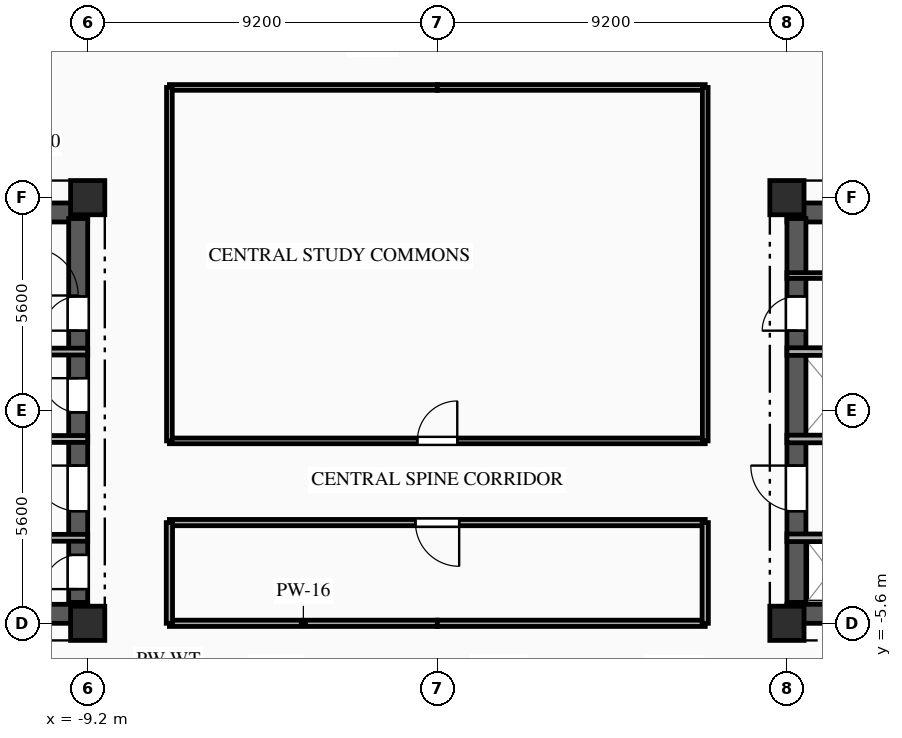
"""IFC4 building model, lengths in metres.
Left out: names, types, materials, properties, quantities, classifications, styles, units other than length and angle.
Written with IfcOpenShell. Run it as: python <this file> out.ifc"""

import sys

from ifc_helpers import new_model, si_unit, direction, frame, frame_2d, origin, origin_2d, place, context, subcontext, project, spatial, rectangle, extrude, element, fill, save


model = new_model("IFC4")
c1 = context("Model", 3, precision=1e-05, world=origin(), true_north=direction((0.0, 1.0)))
c2 = subcontext(c1, "Body", "Model", "MODEL_VIEW")
j1 = project(units=[si_unit("LENGTHUNIT", "METRE"), si_unit("PLANEANGLEUNIT", "RADIAN")], contexts=[c1])
p1 = place(None, origin())
s1 = spatial("IfcSite", under=j1, at=p1, CompositionType="ELEMENT")
p2 = place(p1, origin())
s2 = spatial("IfcBuilding", under=s1, at=p2, CompositionType="ELEMENT")
p3 = place(p2, frame((0.0, 0.0, 151.1)))
s3 = spatial("IfcBuildingStorey", under=s2, at=p3, CompositionType="ELEMENT", Elevation=151.1)
for number, where, z_axis, x_axis in (
    (1, (-9.2, -5.6, 0.0), (0.0, 0.0, 1.0), (1.0, 0.0, 0.0)),
    (2, (-9.2, 5.6, 0.0), (0.0, 0.0, 1.0), (1.0, 0.0, 0.0)),
    (3, (9.2, -5.6, 0.0), (0.0, 0.0, 1.0), (1.0, 0.0, 0.0)),
    (4, (9.2, 5.6, 0.0), (0.0, 0.0, 1.0), (1.0, 0.0, 0.0)),
):
    element("IfcColumn", number, at=place(p3, frame(where, z_axis=z_axis, x_axis=x_axis)), inside=s3, PredefinedType="COLUMN", context=c2, shape_type="SweptSolid", body=[
        extrude(rectangle(XDim=0.9, YDim=0.9, at=origin_2d()), origin(), (0.0, 0.0, 1.0), 3.35),
    ])
p4 = place(p3, frame((-18.8, 5.21, 0.0), z_axis=(0.0, 0.0, 1.0), x_axis=(1.0, 0.0, 0.0)))
e5 = element("IfcWall", 5, at=p4, inside=s3, PredefinedType="SHEAR", context=c2, shape_type="SweptSolid", body=[
    extrude(rectangle(XDim=9.6, YDim=0.5, at=frame_2d((4.8, 0.0))), origin(), (0.0, 0.0, 1.0), 3.04),
])
p5 = place(p4, frame((1.55, 0.0, 0.0)))
e6 = element("IfcOpeningElement", 6, at=p5, cuts=e5, PredefinedType="OPENING", context=c2, shape_type="SweptSolid", body=[
    extrude(rectangle(XDim=1.1, YDim=2.15, at=frame_2d((0.55, 1.075))), frame((0.0, 0.26, 0.0), z_axis=(0.0, -1.0, 0.0), x_axis=(1.0, 0.0, 0.0)), (0.0, 0.0, 1.0), 0.52),
])
p6 = place(p4, frame((4.775, 0.0, 0.0)))
e7 = element("IfcOpeningElement", 7, at=p6, cuts=e5, PredefinedType="OPENING", context=c2, shape_type="SweptSolid", body=[
    extrude(rectangle(XDim=1.05, YDim=2.1, at=frame_2d((0.525, 1.05))), frame((0.0, 0.26, 0.0), z_axis=(0.0, -1.0, 0.0), x_axis=(1.0, 0.0, 0.0)), (0.0, 0.0, 1.0), 0.52),
])
p7 = place(p3, frame((-18.8, -5.35, 0.0), z_axis=(0.0, 0.0, 1.0), x_axis=(1.0, 0.0, 0.0)))
e8 = element("IfcWall", 8, at=p7, inside=s3, PredefinedType="SHEAR", context=c2, shape_type="SweptSolid", body=[
    extrude(rectangle(XDim=9.6, YDim=0.5, at=frame_2d((4.8, 0.0))), origin(), (0.0, 0.0, 1.0), 3.04),
])
p8 = place(p7, frame((1.05, 0.0, 0.0)))
e9 = element("IfcOpeningElement", 9, at=p8, cuts=e8, PredefinedType="OPENING", context=c2, shape_type="SweptSolid", body=[
    extrude(rectangle(XDim=0.9, YDim=2.1, at=frame_2d((0.45, 1.05))), frame((0.0, 0.26, 0.0), z_axis=(0.0, -1.0, 0.0), x_axis=(1.0, 0.0, 0.0)), (0.0, 0.0, 1.0), 0.52),
])
p9 = place(p3, frame((-9.45, -5.05, 0.0), z_axis=(0.0, 0.0, 1.0), x_axis=(0.0, 1.0, 0.0)))
e10 = element("IfcWall", 10, at=p9, inside=s3, PredefinedType="SHEAR", context=c2, shape_type="SweptSolid", body=[
    extrude(rectangle(XDim=10.1, YDim=0.5, at=frame_2d((5.05, 0.0))), origin(), (0.0, 0.0, 1.0), 3.04),
])
p10 = place(p9, frame((7.15, 0.0, 0.0)))
e11 = element("IfcOpeningElement", 11, at=p10, cuts=e10, PredefinedType="OPENING", context=c2, shape_type="SweptSolid", body=[
    extrude(rectangle(XDim=0.9, YDim=2.1, at=frame_2d((0.45, 1.05))), frame((0.0, 0.26, 0.0), z_axis=(0.0, -1.0, 0.0), x_axis=(1.0, 0.0, 0.0)), (0.0, 0.0, 1.0), 0.52),
])
p11 = place(p9, frame((2.4, 0.0, 0.0)))
e12 = element("IfcOpeningElement", 12, at=p11, cuts=e10, PredefinedType="OPENING", context=c2, shape_type="SweptSolid", body=[
    extrude(rectangle(XDim=1.2, YDim=2.15, at=frame_2d((0.6, 1.075))), frame((0.0, 0.26, 0.0), z_axis=(0.0, -1.0, 0.0), x_axis=(1.0, 0.0, 0.0)), (0.0, 0.0, 1.0), 0.52),
])
p12 = place(p9, frame((0.35, 0.0, 0.0)))
e13 = element("IfcOpeningElement", 13, at=p12, cuts=e10, PredefinedType="OPENING", context=c2, shape_type="SweptSolid", body=[
    extrude(rectangle(XDim=0.9, YDim=2.1, at=frame_2d((0.45, 1.05))), frame((0.0, 0.26, 0.0), z_axis=(0.0, -1.0, 0.0), x_axis=(1.0, 0.0, 0.0)), (0.0, 0.0, 1.0), 0.52),
])
p13 = place(p9, frame((5.0, 0.0, 0.0)))
e14 = element("IfcOpeningElement", 14, at=p13, cuts=e10, PredefinedType="OPENING", context=c2, shape_type="SweptSolid", body=[
    extrude(rectangle(XDim=0.9, YDim=2.1, at=frame_2d((0.45, 1.05))), frame((0.0, 0.26, 0.0), z_axis=(0.0, -1.0, 0.0), x_axis=(1.0, 0.0, 0.0)), (0.0, 0.0, 1.0), 0.52),
])
p14 = place(p3, frame((9.2, 5.21, 0.0), z_axis=(0.0, 0.0, 1.0), x_axis=(1.0, 0.0, 0.0)))
e15 = element("IfcWall", 15, at=p14, inside=s3, PredefinedType="SHEAR", context=c2, shape_type="SweptSolid", body=[
    extrude(rectangle(XDim=9.6, YDim=0.5, at=frame_2d((4.8, 0.0))), origin(), (0.0, 0.0, 1.0), 3.04),
])
p15 = place(p14, frame((6.95, 0.0, 0.0)))
e16 = element("IfcOpeningElement", 16, at=p15, cuts=e15, PredefinedType="OPENING", context=c2, shape_type="SweptSolid", body=[
    extrude(rectangle(XDim=1.1, YDim=2.15, at=frame_2d((0.55, 1.075))), frame((0.0, 0.26, 0.0), z_axis=(0.0, -1.0, 0.0), x_axis=(1.0, 0.0, 0.0)), (0.0, 0.0, 1.0), 0.52),
])
p16 = place(p14, frame((3.775, 0.0, 0.0)))
e17 = element("IfcOpeningElement", 17, at=p16, cuts=e15, PredefinedType="OPENING", context=c2, shape_type="SweptSolid", body=[
    extrude(rectangle(XDim=1.05, YDim=2.1, at=frame_2d((0.525, 1.05))), frame((0.0, 0.26, 0.0), z_axis=(0.0, -1.0, 0.0), x_axis=(1.0, 0.0, 0.0)), (0.0, 0.0, 1.0), 0.52),
])
p17 = place(p3, frame((9.2, -5.35, 0.0), z_axis=(0.0, 0.0, 1.0), x_axis=(1.0, 0.0, 0.0)))
e18 = element("IfcWall", 18, at=p17, inside=s3, PredefinedType="SHEAR", context=c2, shape_type="SweptSolid", body=[
    extrude(rectangle(XDim=9.6, YDim=0.5, at=frame_2d((4.8, 0.0))), origin(), (0.0, 0.0, 1.0), 3.04),
])
p18 = place(p17, frame((7.65, 0.0, 0.0)))
e19 = element("IfcOpeningElement", 19, at=p18, cuts=e18, PredefinedType="OPENING", context=c2, shape_type="SweptSolid", body=[
    extrude(rectangle(XDim=0.9, YDim=2.1, at=frame_2d((0.45, 1.05))), frame((0.0, 0.26, 0.0), z_axis=(0.0, -1.0, 0.0), x_axis=(1.0, 0.0, 0.0)), (0.0, 0.0, 1.0), 0.52),
])
p19 = place(p3, frame((9.45, -5.05, 0.0), z_axis=(0.0, 0.0, 1.0), x_axis=(0.0, 1.0, 0.0)))
e20 = element("IfcWall", 20, at=p19, inside=s3, PredefinedType="SHEAR", context=c2, shape_type="SweptSolid", body=[
    extrude(rectangle(XDim=10.1, YDim=0.5, at=frame_2d((5.05, 0.0))), origin(), (0.0, 0.0, 1.0), 3.04),
])
p20 = place(p19, frame((7.15, 0.0, 0.0)))
e21 = element("IfcOpeningElement", 21, at=p20, cuts=e20, PredefinedType="OPENING", context=c2, shape_type="SweptSolid", body=[
    extrude(rectangle(XDim=0.9, YDim=2.1, at=frame_2d((0.45, 1.05))), frame((0.0, 0.26, 0.0), z_axis=(0.0, -1.0, 0.0), x_axis=(1.0, 0.0, 0.0)), (0.0, 0.0, 1.0), 0.52),
])
p21 = place(p19, frame((2.4, 0.0, 0.0)))
e22 = element("IfcOpeningElement", 22, at=p21, cuts=e20, PredefinedType="OPENING", context=c2, shape_type="SweptSolid", body=[
    extrude(rectangle(XDim=1.2, YDim=2.15, at=frame_2d((0.6, 1.075))), frame((0.0, 0.26, 0.0), z_axis=(0.0, -1.0, 0.0), x_axis=(1.0, 0.0, 0.0)), (0.0, 0.0, 1.0), 0.52),
])
p22 = place(p3, frame((-10.7, 1.55, 0.0), z_axis=(0.0, 0.0, 1.0), x_axis=(1.0, 0.0, 0.0)))
e23 = element("IfcWall", 23, at=p22, inside=s3, PredefinedType="PARTITIONING", context=c2, shape_type="SweptSolid", body=[
    extrude(rectangle(XDim=1.5, YDim=0.18, at=frame_2d((0.75, 0.0))), origin(), (0.0, 0.0, 1.0), 3.04),
])
p23 = place(p3, frame((-15.05, -3.35, 0.0), z_axis=(0.0, 0.0, 1.0), x_axis=(1.0, 0.0, 0.0)))
e24 = element("IfcWall", 24, at=p23, inside=s3, PredefinedType="PARTITIONING", context=c2, shape_type="SweptSolid", body=[
    extrude(rectangle(XDim=5.85, YDim=0.18, at=frame_2d((2.925, 0.0))), origin(), (0.0, 0.0, 1.0), 2.755),
])
p24 = place(p3, frame((-9.2, -0.75, 0.0), z_axis=(0.0, 0.0, 1.0), x_axis=(-1.0, 0.0, 0.0)))
e25 = element("IfcWall", 25, at=p24, inside=s3, PredefinedType="PARTITIONING", context=c2, shape_type="SweptSolid", body=[
    extrude(rectangle(XDim=5.85, YDim=0.18, at=frame_2d((2.925, 0.0))), origin(), (0.0, 0.0, 1.0), 3.04),
])
p25 = place(p3, frame((12.15, 3.55, 0.0), z_axis=(0.0, 0.0, 1.0), x_axis=(-1.0, 0.0, 0.0)))
e26 = element("IfcWall", 26, at=p25, inside=s3, PredefinedType="PARTITIONING", context=c2, shape_type="SweptSolid", body=[
    extrude(rectangle(XDim=2.95, YDim=0.15, at=frame_2d((1.475, 0.0))), origin(), (0.0, 0.0, 1.0), 3.04),
])
p26 = place(p25, frame((0.325, 0.0, 0.0)))
e27 = element("IfcOpeningElement", 27, at=p26, cuts=e26, PredefinedType="OPENING", context=c2, shape_type="SweptSolid", body=[
    extrude(rectangle(XDim=0.95, YDim=2.1, at=frame_2d((0.475, 1.05))), frame((0.0, 0.085, 0.0), z_axis=(0.0, -1.0, 0.0), x_axis=(1.0, 0.0, 0.0)), (0.0, 0.0, 1.0), 0.17),
])
p27 = place(p3, frame((9.2, -3.35, 0.0), z_axis=(0.0, 0.0, 1.0), x_axis=(1.0, 0.0, 0.0)))
e28 = element("IfcWall", 28, at=p27, inside=s3, PredefinedType="PARTITIONING", context=c2, shape_type="SweptSolid", body=[
    extrude(rectangle(XDim=1.88, YDim=0.2, at=frame_2d((0.94, 0.0))), origin(), (0.0, 0.0, 1.0), 2.755),
])
p28 = place(p3, frame((11.46, -0.75, 0.0), z_axis=(0.0, 0.0, 1.0), x_axis=(-1.0, 0.0, 0.0)))
e29 = element("IfcWall", 29, at=p28, inside=s3, PredefinedType="PARTITIONING", context=c2, shape_type="SweptSolid", body=[
    extrude(rectangle(XDim=2.26, YDim=0.2, at=frame_2d((1.13, 0.0))), origin(), (0.0, 0.0, 1.0), 3.04),
])
for number, where, z_axis, x_axis in (
    (30, (0.0, 8.5, 0.0), (0.0, 0.0, 1.0), (-1.0, 0.0, 0.0)),
    (31, (7.05, 8.5, 0.0), (0.0, 0.0, 1.0), (-1.0, 0.0, 0.0)),
):
    element("IfcWall", number, at=place(p3, frame(where, z_axis=z_axis, x_axis=x_axis)), inside=s3, PredefinedType="PARTITIONING", context=c2, shape_type="SweptSolid", body=[
        extrude(rectangle(XDim=7.05, YDim=0.15, at=frame_2d((3.525, 0.0))), origin(), (0.0, 0.0, 1.0), 3.04),
    ])
for number, where, z_axis, x_axis in (
    (32, (-7.05, -5.6, 0.0), (0.0, 0.0, 1.0), (1.0, 0.0, 0.0)),
    (33, (0.0, -5.6, 0.0), (0.0, 0.0, 1.0), (1.0, 0.0, 0.0)),
):
    element("IfcWall", number, at=place(p3, frame(where, z_axis=z_axis, x_axis=x_axis)), inside=s3, PredefinedType="PARTITIONING", context=c2, shape_type="SweptSolid", body=[
        extrude(rectangle(XDim=7.05, YDim=0.165, at=frame_2d((3.525, 0.0))), origin(), (0.0, 0.0, 1.0), 2.525),
    ])
p29 = place(p3, frame((-7.05, -0.8, 0.0), z_axis=(0.0, 0.0, 1.0), x_axis=(1.0, 0.0, 0.0)))
e34 = element("IfcWall", 34, at=p29, inside=s3, PredefinedType="PARTITIONING", context=c2, shape_type="SweptSolid", body=[
    extrude(rectangle(XDim=14.1, YDim=0.15, at=frame_2d((7.05, 0.0))), origin(), (0.0, 0.0, 1.0), 3.04),
])
p30 = place(p29, frame((6.525, 0.0, 0.0)))
e35 = element("IfcOpeningElement", 35, at=p30, cuts=e34, PredefinedType="OPENING", context=c2, shape_type="SweptSolid", body=[
    extrude(rectangle(XDim=1.05, YDim=2.15, at=frame_2d((0.525, 1.075))), frame((0.0, 0.085, 0.0), z_axis=(0.0, -1.0, 0.0), x_axis=(1.0, 0.0, 0.0)), (0.0, 0.0, 1.0), 0.17),
])
p31 = place(p3, frame((7.05, -2.95, 0.0), z_axis=(0.0, 0.0, 1.0), x_axis=(-1.0, 0.0, 0.0)))
e36 = element("IfcWall", 36, at=p31, inside=s3, PredefinedType="PARTITIONING", context=c2, shape_type="SweptSolid", body=[
    extrude(rectangle(XDim=14.1, YDim=0.165, at=frame_2d((7.05, 0.0))), origin(), (0.0, 0.0, 1.0), 3.04),
])
p32 = place(p31, frame((6.475, 0.0, 0.0)))
e37 = element("IfcOpeningElement", 37, at=p32, cuts=e36, PredefinedType="OPENING", context=c2, shape_type="SweptSolid", body=[
    extrude(rectangle(XDim=1.15, YDim=2.15, at=frame_2d((0.575, 1.075))), frame((0.0, 0.093, 0.0), z_axis=(0.0, -1.0, 0.0), x_axis=(1.0, 0.0, 0.0)), (0.0, 0.0, 1.0), 0.185),
])
p33 = place(p3, frame((-7.05, 8.5, 0.0), z_axis=(0.0, 0.0, 1.0), x_axis=(0.0, -1.0, 0.0)))
e38 = element("IfcWall", 38, at=p33, inside=s3, PredefinedType="PARTITIONING", context=c2, shape_type="SweptSolid", body=[
    extrude(rectangle(XDim=9.3, YDim=0.15, at=frame_2d((4.65, 0.0))), origin(), (0.0, 0.0, 1.0), 3.04),
])
p34 = place(p3, frame((-7.05, -2.95, 0.0), z_axis=(0.0, 0.0, 1.0), x_axis=(0.0, -1.0, 0.0)))
e39 = element("IfcWall", 39, at=p34, inside=s3, PredefinedType="PARTITIONING", context=c2, shape_type="SweptSolid", body=[
    extrude(rectangle(XDim=2.65, YDim=0.165, at=frame_2d((1.325, 0.0))), origin(), (0.0, 0.0, 1.0), 3.04),
])
p35 = place(p3, frame((7.05, -0.8, 0.0), z_axis=(0.0, 0.0, 1.0), x_axis=(0.0, 1.0, 0.0)))
e40 = element("IfcWall", 40, at=p35, inside=s3, PredefinedType="PARTITIONING", context=c2, shape_type="SweptSolid", body=[
    extrude(rectangle(XDim=9.3, YDim=0.15, at=frame_2d((4.65, 0.0))), origin(), (0.0, 0.0, 1.0), 3.04),
])
p36 = place(p3, frame((7.05, -5.6, 0.0), z_axis=(0.0, 0.0, 1.0), x_axis=(0.0, 1.0, 0.0)))
e41 = element("IfcWall", 41, at=p36, inside=s3, PredefinedType="PARTITIONING", context=c2, shape_type="SweptSolid", body=[
    extrude(rectangle(XDim=2.65, YDim=0.165, at=frame_2d((1.325, 0.0))), origin(), (0.0, 0.0, 1.0), 3.04),
])
p37 = place(p3, frame((9.2, 1.55, 0.0), z_axis=(0.0, 0.0, 1.0), x_axis=(1.0, 0.0, 0.0)))
e42 = element("IfcWall", 42, at=p37, inside=s3, PredefinedType="PARTITIONING", context=c2, shape_type="SweptSolid", body=[
    extrude(rectangle(XDim=5.82, YDim=0.2, at=frame_2d((2.91, 0.0))), origin(), (0.0, 0.0, 1.0), 3.04),
])
p38 = place(p10, origin())
e43 = element("IfcDoor", 43, at=p38, inside=s3, OperationType="SINGLE_SWING_LEFT", PredefinedType="DOOR", context=c2, shape_type="SweptSolid", body=[
    extrude(rectangle(XDim=0.9, YDim=2.1, at=frame_2d((0.45, 1.05))), frame((0.0, 0.025, 0.0), z_axis=(0.0, -1.0, 0.0), x_axis=(1.0, 0.0, 0.0)), (0.0, 0.0, 1.0), 0.05),
])
fill(e11, e43)
p39 = place(p11, origin())
e44 = element("IfcDoor", 44, at=p39, inside=s3, OperationType="SINGLE_SWING_RIGHT", PredefinedType="DOOR", context=c2, shape_type="SweptSolid", body=[
    extrude(rectangle(XDim=1.2, YDim=2.15, at=frame_2d((0.6, 1.075))), frame((0.0, 0.025, 0.0), z_axis=(0.0, -1.0, 0.0), x_axis=(1.0, 0.0, 0.0)), (0.0, 0.0, 1.0), 0.05),
])
fill(e12, e44)
p40 = place(p12, origin())
e45 = element("IfcDoor", 45, at=p40, inside=s3, OperationType="SINGLE_SWING_LEFT", PredefinedType="DOOR", context=c2, shape_type="SweptSolid", body=[
    extrude(rectangle(XDim=0.9, YDim=2.1, at=frame_2d((0.45, 1.05))), frame((0.0, 0.025, 0.0), z_axis=(0.0, -1.0, 0.0), x_axis=(1.0, 0.0, 0.0)), (0.0, 0.0, 1.0), 0.05),
])
fill(e13, e45)
p41 = place(p13, origin())
e46 = element("IfcDoor", 46, at=p41, inside=s3, OperationType="SINGLE_SWING_RIGHT", PredefinedType="DOOR", context=c2, shape_type="SweptSolid", body=[
    extrude(rectangle(XDim=0.9, YDim=2.1, at=frame_2d((0.45, 1.05))), frame((0.0, 0.025, 0.0), z_axis=(0.0, -1.0, 0.0), x_axis=(1.0, 0.0, 0.0)), (0.0, 0.0, 1.0), 0.05),
])
fill(e14, e46)
p42 = place(p20, origin())
e47 = element("IfcDoor", 47, at=p42, inside=s3, OperationType="SINGLE_SWING_LEFT", PredefinedType="DOOR", context=c2, shape_type="SweptSolid", body=[
    extrude(rectangle(XDim=0.9, YDim=2.1, at=frame_2d((0.45, 1.05))), frame((0.0, 0.025, 0.0), z_axis=(0.0, -1.0, 0.0), x_axis=(1.0, 0.0, 0.0)), (0.0, 0.0, 1.0), 0.05),
])
fill(e21, e47)
p43 = place(p21, origin())
e48 = element("IfcDoor", 48, at=p43, inside=s3, OperationType="SINGLE_SWING_RIGHT", PredefinedType="DOOR", context=c2, shape_type="SweptSolid", body=[
    extrude(rectangle(XDim=1.2, YDim=2.15, at=frame_2d((0.6, 1.075))), frame((0.0, 0.025, 0.0), z_axis=(0.0, -1.0, 0.0), x_axis=(1.0, 0.0, 0.0)), (0.0, 0.0, 1.0), 0.05),
])
fill(e22, e48)
p44 = place(p30, origin())
e49 = element("IfcDoor", 49, at=p44, inside=s3, OperationType="SINGLE_SWING_RIGHT", PredefinedType="DOOR", context=c2, shape_type="SweptSolid", body=[
    extrude(rectangle(XDim=1.05, YDim=2.15, at=frame_2d((0.525, 1.075))), frame((0.0, 0.025, 0.0), z_axis=(0.0, -1.0, 0.0), x_axis=(1.0, 0.0, 0.0)), (0.0, 0.0, 1.0), 0.05),
])
fill(e35, e49)
p45 = place(p32, origin())
e50 = element("IfcDoor", 50, at=p45, inside=s3, OperationType="SINGLE_SWING_LEFT", PredefinedType="DOOR", context=c2, shape_type="SweptSolid", body=[
    extrude(rectangle(XDim=1.15, YDim=2.15, at=frame_2d((0.575, 1.075))), frame((0.0, 0.025, 0.0), z_axis=(0.0, -1.0, 0.0), x_axis=(1.0, 0.0, 0.0)), (0.0, 0.0, 1.0), 0.05),
])
fill(e37, e50)
save(model, sys.argv[1])
